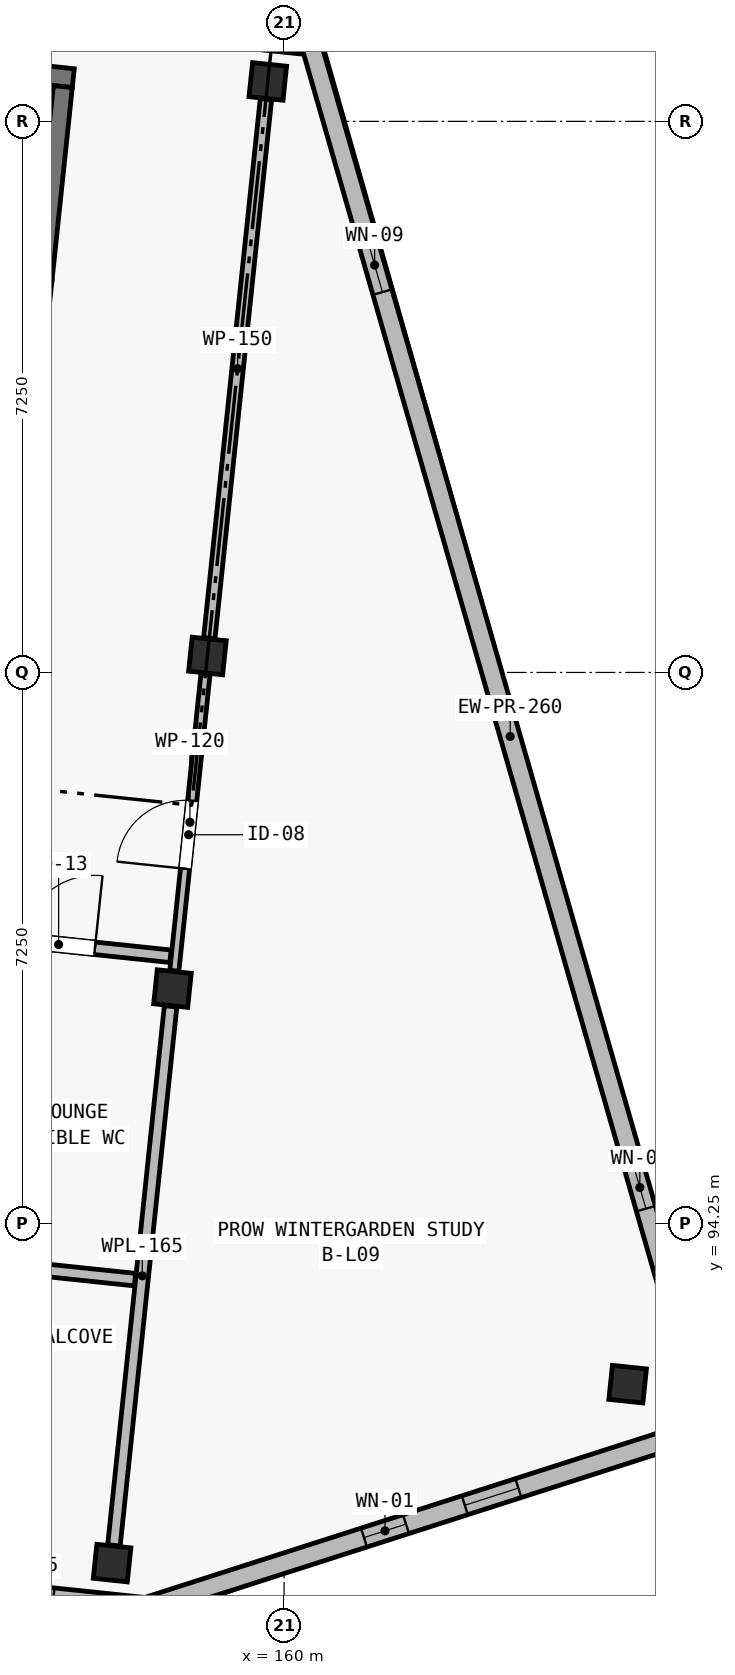
"""IFC4 building model, lengths in metres.
Left out: names, types, materials, properties, quantities, classifications, styles, units other than length and angle.
Written with IfcOpenShell. Run it as: python <this file> out.ifc"""

import sys

from ifc_helpers import new_model, si_unit, direction, frame, frame_2d, origin, origin_2d, place, context, subcontext, project, spatial, rectangle, extrude, element, fill, save


model = new_model("IFC4")
c1 = context("Model", 3, precision=1e-05, world=origin(), true_north=direction((0.0, 1.0)))
c2 = subcontext(c1, "Body", "Model", "MODEL_VIEW")
j1 = project(units=[si_unit("LENGTHUNIT", "METRE"), si_unit("PLANEANGLEUNIT", "RADIAN")], contexts=[c1])
p1 = place(None, origin())
s1 = spatial("IfcSite", under=j1, at=p1, CompositionType="ELEMENT")
p2 = place(p1, origin())
s2 = spatial("IfcBuilding", under=s1, at=p2, CompositionType="ELEMENT")
p3 = place(p2, frame((0.0, 0.0, 31.15)))
s3 = spatial("IfcBuildingStorey", under=s2, at=p3, CompositionType="ELEMENT", Elevation=31.15)
for number, where, z_axis, x_axis in (
    (1, (157.737, 89.783, 0.0), (0.0, 0.0, 1.0), (0.995, -0.105, 0.0)),
    (2, (158.531, 97.341, 0.0), (0.0, 0.0, 1.0), (0.995, -0.105, 0.0)),
    (3, (158.991, 101.717, 0.0), (0.0, 0.0, 1.0), (0.995, -0.105, 0.0)),
    (4, (159.786, 109.275, 0.0), (0.0, 0.0, 1.0), (0.995, -0.105, 0.0)),
    (5, (164.52, 92.136, 0.0), (0.0, 0.0, 1.0), (0.995, -0.105, 0.0)),
):
    element("IfcColumn", number, at=place(p3, frame(where, z_axis=z_axis, x_axis=x_axis)), inside=s3, PredefinedType="COLUMN", context=c2, shape_type="SweptSolid", body=[
        extrude(rectangle(XDim=0.45, YDim=0.45, at=origin_2d()), origin(), (0.0, 0.0, 1.0), 3.25),
    ])
p4 = place(p3, frame((152.204, 109.846, 0.0), z_axis=(0.0, 0.0, 1.0), x_axis=(0.994522922189, -0.104518693261, 0.0)))
e6 = element("IfcWall", 6, at=p4, inside=s3, PredefinedType="SHEAR", context=c2, shape_type="SweptSolid", body=[
    extrude(rectangle(XDim=5.05, YDim=0.25, at=frame_2d((2.525, 0.0))), origin(), (0.0, 0.0, 1.0), 3.25),
])
p5 = place(p3, frame((156.822, 106.671, 0.0), z_axis=(0.0, 0.0, 1.0), x_axis=(0.104545242946, 0.99452013161, 0.0)))
e7 = element("IfcWall", 7, at=p5, inside=s3, PredefinedType="SHEAR", context=c2, shape_type="SweptSolid", body=[
    extrude(rectangle(XDim=2.55, YDim=0.25, at=frame_2d((1.275, 0.0))), origin(), (0.0, 0.0, 1.0), 3.25),
])
p6 = place(p3, frame((158.204, 89.206, 0.0), z_axis=(0.0, 0.0, 1.0), x_axis=(-0.994521760736, 0.104529744196, 0.0)))
e8 = element("IfcWall", 8, at=p6, inside=s3, PredefinedType="SOLIDWALL", context=c2, shape_type="SweptSolid", body=[
    extrude(rectangle(XDim=8.525, YDim=0.24, at=frame_2d((4.262, 0.0))), origin(), (0.0, 0.0, 1.0), 3.0),
])
p7 = place(p6, frame((1.244, 0.0, 0.52)))
e9 = element("IfcOpeningElement", 9, at=p7, cuts=e8, PredefinedType="OPENING", context=c2, shape_type="SweptSolid", body=[
    extrude(rectangle(XDim=0.66, YDim=2.32, at=frame_2d((0.33, 1.16))), frame((0.0, 0.135, 0.0), z_axis=(0.0, -1.0, 0.0), x_axis=(1.0, 0.0, 0.0)), (0.0, 0.0, 1.0), 0.27),
])
p8 = place(p6, frame((3.835, 0.0, 0.52)))
e10 = element("IfcOpeningElement", 10, at=p8, cuts=e8, PredefinedType="OPENING", context=c2, shape_type="SweptSolid", body=[
    extrude(rectangle(XDim=0.72, YDim=2.16, at=frame_2d((0.36, 1.08))), frame((0.0, 0.135, 0.0), z_axis=(0.0, -1.0, 0.0), x_axis=(1.0, 0.0, 0.0)), (0.0, 0.0, 1.0), 0.27),
])
p9 = place(p6, frame((7.175, 0.0, 0.42)))
e11 = element("IfcOpeningElement", 11, at=p9, cuts=e8, PredefinedType="OPENING", context=c2, shape_type="SweptSolid", body=[
    extrude(rectangle(XDim=0.74, YDim=2.26, at=frame_2d((0.37, 1.13))), frame((0.0, 0.135, 0.0), z_axis=(0.0, -1.0, 0.0), x_axis=(1.0, 0.0, 0.0)), (0.0, 0.0, 1.0), 0.27),
])
p10 = place(p3, frame((151.885, 110.634, 0.0), z_axis=(0.0, 0.0, 1.0), x_axis=(0.994521760736, -0.104529744196, 0.0)))
e12 = element("IfcWall", 12, at=p10, inside=s3, PredefinedType="SOLIDWALL", context=c2, shape_type="SweptSolid", body=[
    extrude(rectangle(XDim=8.525, YDim=0.24, at=frame_2d((4.262, 0.0))), origin(), (0.0, 0.0, 1.0), 3.0),
])
p11 = place(p3, frame((160.363, 109.742, 0.0), z_axis=(0.0, 0.0, 1.0), x_axis=(0.276322184526, -0.961065060409, 0.0)))
e13 = element("IfcWall", 13, at=p11, inside=s3, PredefinedType="SOLIDWALL", context=c2, shape_type="SweptSolid", body=[
    extrude(rectangle(XDim=18.907, YDim=0.26, at=frame_2d((9.453, 0.0))), origin(), (0.0, 0.0, 1.0), 3.0),
])
p12 = place(p11, frame((2.63, 0.0, 0.52)))
e14 = element("IfcOpeningElement", 14, at=p12, cuts=e13, PredefinedType="OPENING", context=c2, shape_type="SweptSolid", body=[
    extrude(rectangle(XDim=0.74, YDim=2.26, at=frame_2d((0.37, 1.13))), frame((0.0, 0.145, 0.0), z_axis=(0.0, -1.0, 0.0), x_axis=(1.0, 0.0, 0.0)), (0.0, 0.0, 1.0), 0.29),
])
p13 = place(p11, frame((15.337, 0.0, 0.45)))
e15 = element("IfcOpeningElement", 15, at=p13, cuts=e13, PredefinedType="OPENING", context=c2, shape_type="SweptSolid", body=[
    extrude(rectangle(XDim=0.58, YDim=2.16, at=frame_2d((0.29, 1.08))), frame((0.0, 0.145, 0.0), z_axis=(0.0, -1.0, 0.0), x_axis=(1.0, 0.0, 0.0)), (0.0, 0.0, 1.0), 0.29),
])
p14 = place(p3, frame((165.587, 91.572, 0.0), z_axis=(0.0, 0.0, 1.0), x_axis=(-0.9522851043, -0.305209895201, 0.0)))
e16 = element("IfcWall", 16, at=p14, inside=s3, PredefinedType="SOLIDWALL", context=c2, shape_type="SweptSolid", body=[
    extrude(rectangle(XDim=7.753, YDim=0.26, at=frame_2d((3.876, 0.0))), origin(), (0.0, 0.0, 1.0), 3.0),
])
p15 = place(p14, frame((2.63, 0.0, 0.52)))
e17 = element("IfcOpeningElement", 17, at=p15, cuts=e16, PredefinedType="OPENING", context=c2, shape_type="SweptSolid", body=[
    extrude(rectangle(XDim=0.74, YDim=2.26, at=frame_2d((0.37, 1.13))), frame((0.0, 0.145, 0.0), z_axis=(0.0, -1.0, 0.0), x_axis=(1.0, 0.0, 0.0)), (0.0, 0.0, 1.0), 0.29),
])
p16 = place(p14, frame((4.183, 0.0, 0.45)))
e18 = element("IfcOpeningElement", 18, at=p16, cuts=e16, PredefinedType="OPENING", context=c2, shape_type="SweptSolid", body=[
    extrude(rectangle(XDim=0.58, YDim=2.16, at=frame_2d((0.29, 1.08))), frame((0.0, 0.145, 0.0), z_axis=(0.0, -1.0, 0.0), x_axis=(1.0, 0.0, 0.0)), (0.0, 0.0, 1.0), 0.29),
])
p17 = place(p3, frame((158.556, 97.575, 0.0), z_axis=(0.0, 0.0, 1.0), x_axis=(0.104490754769, 0.994525857968, 0.0)))
e19 = element("IfcWall", 19, at=p17, inside=s3, PredefinedType="PARTITIONING", context=c2, shape_type="SweptSolid", body=[
    extrude(rectangle(XDim=3.93, YDim=0.12, at=frame_2d((1.965, 0.0))), origin(), (0.0, 0.0, 1.0), 2.5),
])
p18 = place(p17, frame((1.35, 0.0, 0.0)))
e20 = element("IfcOpeningElement", 20, at=p18, cuts=e19, PredefinedType="OPENING", context=c2, shape_type="SweptSolid", body=[
    extrude(rectangle(XDim=0.9, YDim=2.1, at=frame_2d((0.45, 1.05))), frame((0.0, 0.075, 0.0), z_axis=(0.0, -1.0, 0.0), x_axis=(1.0, 0.0, 0.0)), (0.0, 0.0, 1.0), 0.15),
])
p19 = place(p3, frame((159.016, 101.951, 0.0), z_axis=(0.0, 0.0, 1.0), x_axis=(0.104540404715, 0.994520640199, 0.0)))
e21 = element("IfcWall", 21, at=p19, inside=s3, PredefinedType="PARTITIONING", context=c2, shape_type="SweptSolid", body=[
    extrude(rectangle(XDim=7.13, YDim=0.15, at=frame_2d((3.565, 0.0))), origin(), (0.0, 0.0, 1.0), 2.5),
])
p20 = place(p3, frame((157.762, 90.016, 0.0), z_axis=(0.0, 0.0, 1.0), x_axis=(0.10450653689, 0.994524199679, 0.0)))
e22 = element("IfcWall", 22, at=p20, inside=s3, PredefinedType="PLUMBINGWALL", context=c2, shape_type="SweptSolid", body=[
    extrude(rectangle(XDim=7.13, YDim=0.165, at=frame_2d((3.565, 0.0))), origin(), (0.0, 0.0, 1.0), 2.5),
])
p21 = place(p3, frame((155.91, 98.039, 0.0), z_axis=(0.0, 0.0, 1.0), x_axis=(0.994526447543, -0.104485143144, 0.0)))
e23 = element("IfcWall", 23, at=p21, inside=s3, PredefinedType="PLUMBINGWALL", context=c2, shape_type="SweptSolid", body=[
    extrude(rectangle(XDim=2.61, YDim=0.165, at=frame_2d((1.305, 0.0))), origin(), (0.0, 0.0, 1.0), 2.97),
])
p22 = place(p21, frame((0.65, 0.0, 0.0)))
e24 = element("IfcOpeningElement", 24, at=p22, cuts=e23, PredefinedType="OPENING", context=c2, shape_type="SweptSolid", body=[
    extrude(rectangle(XDim=0.96, YDim=2.12, at=frame_2d((0.48, 1.06))), frame((0.0, 0.097, 0.0), z_axis=(0.0, -1.0, 0.0), x_axis=(1.0, 0.0, 0.0)), (0.0, 0.0, 1.0), 0.195),
])
p23 = place(p3, frame((155.463, 93.782, 0.0), z_axis=(0.0, 0.0, 1.0), x_axis=(0.994521452323, -0.104532678478, 0.0)))
e25 = element("IfcWall", 25, at=p23, inside=s3, PredefinedType="PLUMBINGWALL", context=c2, shape_type="SweptSolid", body=[
    extrude(rectangle(XDim=2.59, YDim=0.165, at=frame_2d((1.295, 0.0))), origin(), (0.0, 0.0, 1.0), 2.97),
])
p24 = place(p7, origin())
e26 = element("IfcWindow", 26, at=p24, inside=s3, PartitioningType="SINGLE_PANEL", PredefinedType="WINDOW", context=c2, shape_type="SweptSolid", body=[
    extrude(rectangle(XDim=0.66, YDim=2.32, at=frame_2d((0.33, 1.16))), frame((0.0, 0.03, 0.0), z_axis=(0.0, -1.0, 0.0), x_axis=(1.0, 0.0, 0.0)), (0.0, 0.0, 1.0), 0.06),
])
fill(e9, e26)
p25 = place(p12, origin())
e27 = element("IfcWindow", 27, at=p25, inside=s3, PartitioningType="SINGLE_PANEL", PredefinedType="WINDOW", context=c2, shape_type="SweptSolid", body=[
    extrude(rectangle(XDim=0.74, YDim=2.26, at=frame_2d((0.37, 1.13))), frame((0.0, 0.03, 0.0), z_axis=(0.0, -1.0, 0.0), x_axis=(1.0, 0.0, 0.0)), (0.0, 0.0, 1.0), 0.06),
])
fill(e14, e27)
p26 = place(p13, origin())
e28 = element("IfcWindow", 28, at=p26, inside=s3, PartitioningType="SINGLE_PANEL", PredefinedType="WINDOW", context=c2, shape_type="SweptSolid", body=[
    extrude(rectangle(XDim=0.58, YDim=2.16, at=frame_2d((0.29, 1.08))), frame((0.0, 0.03, 0.0), z_axis=(0.0, -1.0, 0.0), x_axis=(1.0, 0.0, 0.0)), (0.0, 0.0, 1.0), 0.06),
])
fill(e15, e28)
p27 = place(p15, origin())
e29 = element("IfcWindow", 29, at=p27, inside=s3, PartitioningType="SINGLE_PANEL", PredefinedType="WINDOW", context=c2, shape_type="SweptSolid", body=[
    extrude(rectangle(XDim=0.74, YDim=2.26, at=frame_2d((0.37, 1.13))), frame((0.0, 0.03, 0.0), z_axis=(0.0, -1.0, 0.0), x_axis=(1.0, 0.0, 0.0)), (0.0, 0.0, 1.0), 0.06),
])
fill(e17, e29)
p28 = place(p16, origin())
e30 = element("IfcWindow", 30, at=p28, inside=s3, PartitioningType="SINGLE_PANEL", PredefinedType="WINDOW", context=c2, shape_type="SweptSolid", body=[
    extrude(rectangle(XDim=0.58, YDim=2.16, at=frame_2d((0.29, 1.08))), frame((0.0, 0.03, 0.0), z_axis=(0.0, -1.0, 0.0), x_axis=(1.0, 0.0, 0.0)), (0.0, 0.0, 1.0), 0.06),
])
fill(e18, e30)
p29 = place(p18, origin())
e31 = element("IfcDoor", 31, at=p29, inside=s3, OperationType="SINGLE_SWING_LEFT", PredefinedType="DOOR", context=c2, shape_type="SweptSolid", body=[
    extrude(rectangle(XDim=0.9, YDim=2.1, at=frame_2d((0.45, 1.05))), frame((0.0, 0.025, 0.0), z_axis=(0.0, -1.0, 0.0), x_axis=(1.0, 0.0, 0.0)), (0.0, 0.0, 1.0), 0.05),
])
fill(e20, e31)
p30 = place(p22, origin())
e32 = element("IfcDoor", 32, at=p30, inside=s3, OperationType="SINGLE_SWING_RIGHT", PredefinedType="DOOR", context=c2, shape_type="SweptSolid", body=[
    extrude(rectangle(XDim=0.96, YDim=2.12, at=frame_2d((0.48, 1.06))), frame((0.0, 0.025, 0.0), z_axis=(0.0, -1.0, 0.0), x_axis=(1.0, 0.0, 0.0)), (0.0, 0.0, 1.0), 0.05),
])
fill(e24, e32)
save(model, sys.argv[1])
